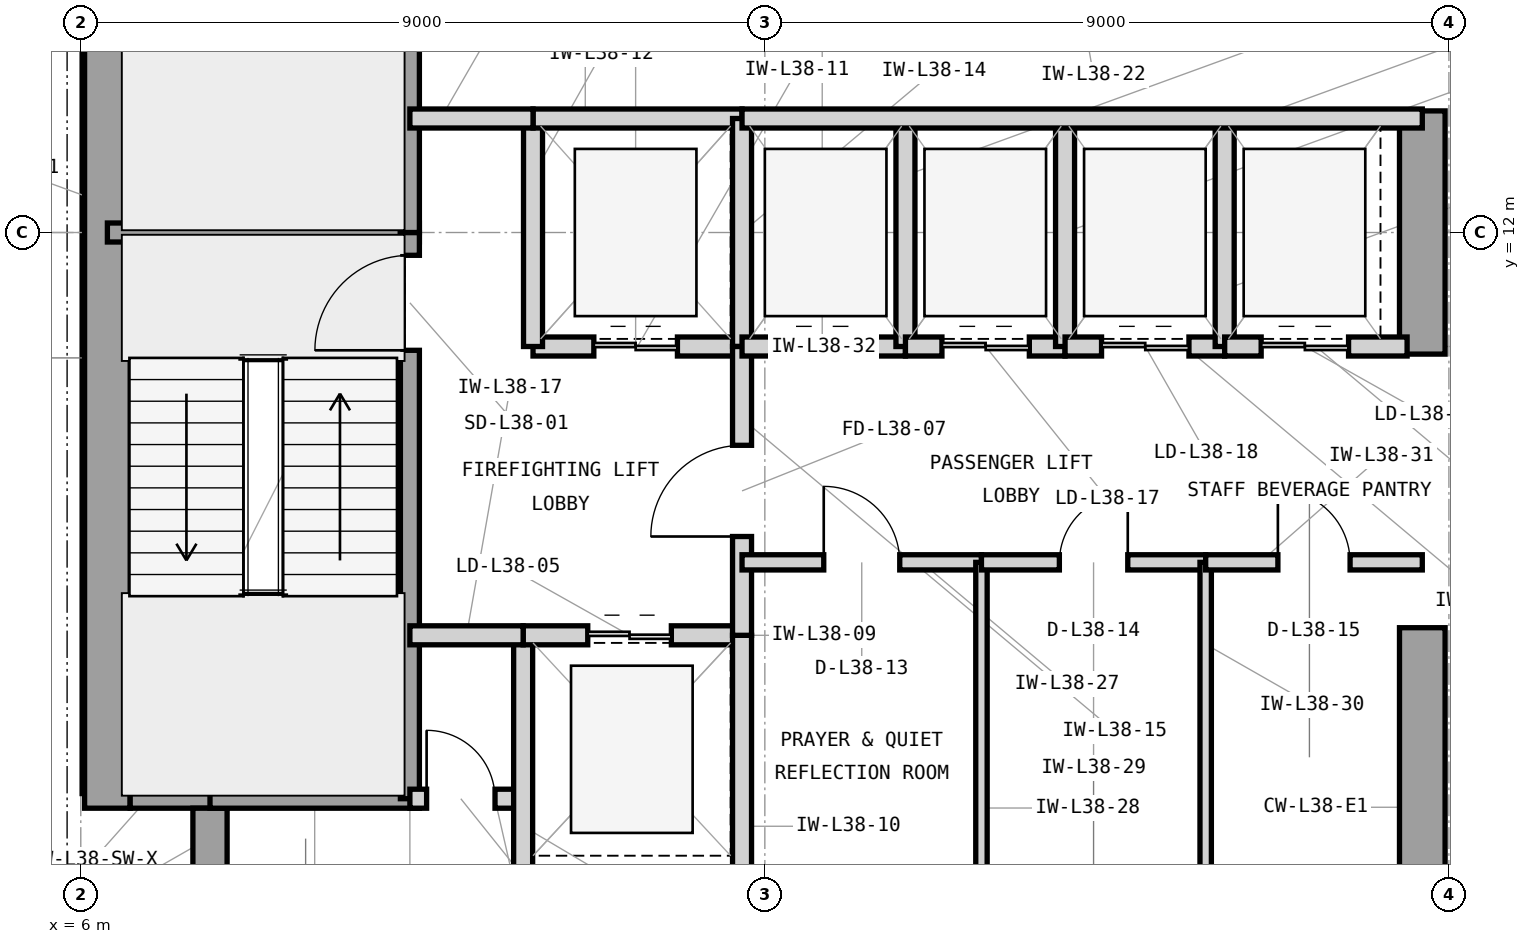
"""IFC4 building model, lengths in metres.
Left out: names, types, materials, properties, quantities, classifications, styles, units other than length and angle.
Written with IfcOpenShell. Run it as: python <this file> out.ifc"""

import sys

from ifc_helpers import new_model, si_unit, direction, frame, frame_2d, origin, place, context, subcontext, project, spatial, rectangle, extrude, element, fill, save


model = new_model("IFC4")
c1 = context("Model", 3, precision=1e-05, world=origin(), true_north=direction((0.0, 1.0)))
c2 = subcontext(c1, "Body", "Model", "MODEL_VIEW")
j1 = project(units=[si_unit("LENGTHUNIT", "METRE"), si_unit("PLANEANGLEUNIT", "RADIAN")], contexts=[c1])
p1 = place(None, origin())
s1 = spatial("IfcSite", under=j1, at=p1, CompositionType="ELEMENT")
p2 = place(p1, origin())
s2 = spatial("IfcBuilding", under=s1, at=p2, CompositionType="ELEMENT")
p3 = place(p2, frame((0.0, 0.0, 160.2)))
s3 = spatial("IfcBuildingStorey", under=s2, at=p3, CompositionType="ELEMENT", Elevation=160.2)
p4 = place(p3, frame((6.35, 4.425, 0.0), z_axis=(0.0, 0.0, 1.0), x_axis=(0.0, 1.0, 0.0)))
e1 = element("IfcWall", 1, at=p4, inside=s3, PredefinedType="SHEAR", context=c2, shape_type="SweptSolid", body=[
    extrude(rectangle(XDim=15.15, YDim=0.6, at=frame_2d((7.575, 0.0))), origin(), (0.0, 0.0, 1.0), 4.2),
])
p5 = place(p3, frame((23.65, 3.65, 0.0), z_axis=(0.0, 0.0, 1.0), x_axis=(0.0, 1.0, 0.0)))
e2 = element("IfcWall", 2, at=p5, inside=s3, PredefinedType="SHEAR", context=c2, shape_type="SweptSolid", body=[
    extrude(rectangle(XDim=3.15, YDim=0.6, at=frame_2d((1.575, 0.0))), origin(), (0.0, 0.0, 1.0), 4.2),
])
p6 = place(p3, frame((23.65, 10.4, 0.0), z_axis=(0.0, 0.0, 1.0), x_axis=(0.0, 1.0, 0.0)))
e3 = element("IfcWall", 3, at=p6, inside=s3, PredefinedType="SHEAR", context=c2, shape_type="SweptSolid", body=[
    extrude(rectangle(XDim=3.2, YDim=0.6, at=frame_2d((1.6, 0.0))), origin(), (0.0, 0.0, 1.0), 4.2),
])
p7 = place(p3, frame((6.65, 4.65, 0.0), z_axis=(0.0, 0.0, 1.0), x_axis=(1.0, 0.0, 0.0)))
e4 = element("IfcWall", 4, at=p7, inside=s3, PredefinedType="SHEAR", context=c2, shape_type="SweptSolid", body=[
    extrude(rectangle(XDim=1.275, YDim=0.45, at=frame_2d((0.638, 0.0))), origin(), (0.0, 0.0, 1.0), 4.2),
])
p8 = place(p3, frame((7.7, 3.65, 0.0), z_axis=(0.0, 0.0, 1.0), x_axis=(0.0, 1.0, 0.0)))
e5 = element("IfcWall", 5, at=p8, inside=s3, PredefinedType="SHEAR", context=c2, shape_type="SweptSolid", body=[
    extrude(rectangle(XDim=0.775, YDim=0.45, at=frame_2d((0.388, 0.0))), origin(), (0.0, 0.0, 1.0), 4.2),
])
p9 = place(p3, frame((6.35, 12.0, 0.0), z_axis=(0.0, 0.0, 1.0), x_axis=(1.0, 0.0, 0.0)))
e6 = element("IfcWall", 6, at=p9, inside=s3, PredefinedType="SHEAR", context=c2, shape_type="SweptSolid", body=[
    extrude(rectangle(XDim=4.105, YDim=0.25, at=frame_2d((2.052, 0.0))), origin(), (0.0, 0.0, 1.0), 4.2),
])
p10 = place(p3, frame((7.7, 4.55, 0.0), z_axis=(0.0, 0.0, 1.0), x_axis=(1.0, 0.0, 0.0)))
e7 = element("IfcWall", 7, at=p10, inside=s3, PredefinedType="SHEAR", context=c2, shape_type="SweptSolid", body=[
    extrude(rectangle(XDim=2.755, YDim=0.25, at=frame_2d((1.377, 0.0))), origin(), (0.0, 0.0, 1.0), 4.2),
])
p11 = place(p3, frame((10.33, 4.55, 0.0), z_axis=(0.0, 0.0, 1.0), x_axis=(0.0, 1.0, 0.0)))
e8 = element("IfcWall", 8, at=p11, inside=s3, PredefinedType="SHEAR", context=c2, shape_type="SweptSolid", body=[
    extrude(rectangle(XDim=7.45, YDim=0.25, at=frame_2d((3.725, 0.0))), origin(), (0.0, 0.0, 1.0), 4.2),
])
p12 = place(p11, frame((5.9, 0.0, 0.0)))
e9 = element("IfcOpeningElement", 9, at=p12, cuts=e8, PredefinedType="OPENING", context=c2, shape_type="SweptSolid", body=[
    extrude(rectangle(XDim=1.25, YDim=2.2, at=frame_2d((0.625, 1.1))), frame((0.0, 0.135, 0.0), z_axis=(0.0, -1.0, 0.0), x_axis=(1.0, 0.0, 0.0)), (0.0, 0.0, 1.0), 0.27),
])
p13 = place(p3, frame((10.33, 12.0, 0.0), z_axis=(0.0, 0.0, 1.0), x_axis=(0.0, 1.0, 0.0)))
e10 = element("IfcWall", 10, at=p13, inside=s3, PredefinedType="SHEAR", context=c2, shape_type="SweptSolid", body=[
    extrude(rectangle(XDim=7.45, YDim=0.25, at=frame_2d((3.725, 0.0))), origin(), (0.0, 0.0, 1.0), 4.2),
])
p14 = place(p13, frame((5.85, 0.0, 0.0)))
e11 = element("IfcOpeningElement", 11, at=p14, cuts=e10, PredefinedType="OPENING", context=c2, shape_type="SweptSolid", body=[
    extrude(rectangle(XDim=1.25, YDim=2.2, at=frame_2d((0.625, 1.1))), frame((0.0, 0.135, 0.0), z_axis=(0.0, -1.0, 0.0), x_axis=(1.0, 0.0, 0.0)), (0.0, 0.0, 1.0), 0.27),
])
p15 = place(p3, frame((10.33, 4.55, 0.0), z_axis=(0.0, 0.0, 1.0), x_axis=(1.0, 0.0, 0.0)))
e12 = element("IfcWall", 12, at=p15, inside=s3, PredefinedType="PARTITIONING", context=c2, shape_type="SweptSolid", body=[
    extrude(rectangle(XDim=1.49, YDim=0.25, at=frame_2d((0.745, 0.0))), origin(), (0.0, 0.0, 1.0), 3.93),
])
p16 = place(p15, frame((0.22, 0.0, 0.0)))
e13 = element("IfcOpeningElement", 13, at=p16, cuts=e12, PredefinedType="OPENING", context=c2, shape_type="SweptSolid", body=[
    extrude(rectangle(XDim=0.9, YDim=2.1, at=frame_2d((0.45, 1.05))), frame((0.0, 0.135, 0.0), z_axis=(0.0, -1.0, 0.0), x_axis=(1.0, 0.0, 0.0)), (0.0, 0.0, 1.0), 0.27),
])
p17 = place(p3, frame((11.82, 3.35, 0.0), z_axis=(0.0, 0.0, 1.0), x_axis=(0.0, 1.0, 0.0)))
e14 = element("IfcWall", 14, at=p17, inside=s3, PredefinedType="PARTITIONING", context=c2, shape_type="SweptSolid", body=[
    extrude(rectangle(XDim=3.35, YDim=0.25, at=frame_2d((1.675, 0.0))), origin(), (0.0, 0.0, 1.0), 3.93),
])
p18 = place(p3, frame((11.82, 6.7, 0.0), z_axis=(0.0, 0.0, 1.0), x_axis=(1.0, 0.0, 0.0)))
e15 = element("IfcWall", 15, at=p18, inside=s3, PredefinedType="PARTITIONING", context=c2, shape_type="SweptSolid", body=[
    extrude(rectangle(XDim=2.88, YDim=0.25, at=frame_2d((1.44, 0.0))), origin(), (0.0, 0.0, 1.0), 3.583),
])
p19 = place(p18, frame((0.85, 0.0, 0.0)))
e16 = element("IfcOpeningElement", 16, at=p19, cuts=e15, PredefinedType="OPENING", context=c2, shape_type="SweptSolid", body=[
    extrude(rectangle(XDim=1.1, YDim=2.25, at=frame_2d((0.55, 1.125))), frame((0.0, 0.135, 0.0), z_axis=(0.0, -1.0, 0.0), x_axis=(1.0, 0.0, 0.0)), (0.0, 0.0, 1.0), 0.27),
])
p20 = place(p3, frame((14.7, 3.35, 0.0), z_axis=(0.0, 0.0, 1.0), x_axis=(0.0, 1.0, 0.0)))
e17 = element("IfcWall", 17, at=p20, inside=s3, PredefinedType="PARTITIONING", context=c2, shape_type="SweptSolid", body=[
    extrude(rectangle(XDim=3.35, YDim=0.25, at=frame_2d((1.675, 0.0))), origin(), (0.0, 0.0, 1.0), 3.93),
])
p21 = place(p3, frame((11.95, 10.5, 0.0), z_axis=(0.0, 0.0, 1.0), x_axis=(1.0, 0.0, 0.0)))
e18 = element("IfcWall", 18, at=p21, inside=s3, PredefinedType="PARTITIONING", context=c2, shape_type="SweptSolid", body=[
    extrude(rectangle(XDim=2.75, YDim=0.25, at=frame_2d((1.375, 0.0))), origin(), (0.0, 0.0, 1.0), 3.583),
])
p22 = place(p21, frame((0.8, 0.0, 0.0)))
e19 = element("IfcOpeningElement", 19, at=p22, cuts=e18, PredefinedType="OPENING", context=c2, shape_type="SweptSolid", body=[
    extrude(rectangle(XDim=1.1, YDim=2.25, at=frame_2d((0.55, 1.125))), frame((0.0, 0.135, 0.0), z_axis=(0.0, -1.0, 0.0), x_axis=(1.0, 0.0, 0.0)), (0.0, 0.0, 1.0), 0.27),
])
p23 = place(p3, frame((11.95, 10.5, 0.0), z_axis=(0.0, 0.0, 1.0), x_axis=(0.0, 1.0, 0.0)))
e20 = element("IfcWall", 20, at=p23, inside=s3, PredefinedType="PARTITIONING", context=c2, shape_type="SweptSolid", body=[
    extrude(rectangle(XDim=3.0, YDim=0.25, at=frame_2d((1.5, 0.0))), origin(), (0.0, 0.0, 1.0), 3.93),
])
p24 = place(p3, frame((11.95, 13.5, 0.0), z_axis=(0.0, 0.0, 1.0), x_axis=(1.0, 0.0, 0.0)))
e21 = element("IfcWall", 21, at=p24, inside=s3, PredefinedType="PARTITIONING", context=c2, shape_type="SweptSolid", body=[
    extrude(rectangle(XDim=2.75, YDim=0.25, at=frame_2d((1.375, 0.0))), origin(), (0.0, 0.0, 1.0), 3.583),
])
p25 = place(p3, frame((14.7, 10.5, 0.0), z_axis=(0.0, 0.0, 1.0), x_axis=(0.0, 1.0, 0.0)))
e22 = element("IfcWall", 22, at=p25, inside=s3, PredefinedType="PARTITIONING", context=c2, shape_type="SweptSolid", body=[
    extrude(rectangle(XDim=3.0, YDim=0.25, at=frame_2d((1.5, 0.0))), origin(), (0.0, 0.0, 1.0), 3.93),
])
p26 = place(p3, frame((14.7, 6.7, 0.0), z_axis=(0.0, 0.0, 1.0), x_axis=(0.0, 1.0, 0.0)))
e23 = element("IfcWall", 23, at=p26, inside=s3, PredefinedType="PARTITIONING", context=c2, shape_type="SweptSolid", body=[
    extrude(rectangle(XDim=3.8, YDim=0.25, at=frame_2d((1.9, 0.0))), origin(), (0.0, 0.0, 1.0), 3.93),
])
p27 = place(p26, frame((1.3, 0.0, 0.0)))
e24 = element("IfcOpeningElement", 24, at=p27, cuts=e23, PredefinedType="OPENING", context=c2, shape_type="SweptSolid", body=[
    extrude(rectangle(XDim=1.2, YDim=2.2, at=frame_2d((0.6, 1.1))), frame((0.0, 0.135, 0.0), z_axis=(0.0, -1.0, 0.0), x_axis=(1.0, 0.0, 0.0)), (0.0, 0.0, 1.0), 0.27),
])
p28 = place(p3, frame((10.33, 13.5, 0.0), z_axis=(0.0, 0.0, 1.0), x_axis=(1.0, 0.0, 0.0)))
e25 = element("IfcWall", 25, at=p28, inside=s3, PredefinedType="PARTITIONING", context=c2, shape_type="SweptSolid", body=[
    extrude(rectangle(XDim=1.62, YDim=0.25, at=frame_2d((0.81, 0.0))), origin(), (0.0, 0.0, 1.0), 3.583),
])
p29 = place(p3, frame((10.33, 6.7, 0.0), z_axis=(0.0, 0.0, 1.0), x_axis=(1.0, 0.0, 0.0)))
e26 = element("IfcWall", 26, at=p29, inside=s3, PredefinedType="PARTITIONING", context=c2, shape_type="SweptSolid", body=[
    extrude(rectangle(XDim=1.49, YDim=0.25, at=frame_2d((0.745, 0.0))), origin(), (0.0, 0.0, 1.0), 3.583),
])
p30 = place(p3, frame((14.7, 7.66, 0.0), z_axis=(0.0, 0.0, 1.0), x_axis=(1.0, 0.0, 0.0)))
e27 = element("IfcWall", 27, at=p30, inside=s3, PredefinedType="PARTITIONING", context=c2, shape_type="SweptSolid", body=[
    extrude(rectangle(XDim=3.15, YDim=0.2, at=frame_2d((1.575, 0.0))), origin(), (0.0, 0.0, 1.0), 3.93),
])
p31 = place(p30, frame((1.075, 0.0, 0.0)))
e28 = element("IfcOpeningElement", 28, at=p31, cuts=e27, PredefinedType="OPENING", context=c2, shape_type="SweptSolid", body=[
    extrude(rectangle(XDim=1.0, YDim=2.15, at=frame_2d((0.5, 1.075))), frame((0.0, 0.11, 0.0), z_axis=(0.0, -1.0, 0.0), x_axis=(1.0, 0.0, 0.0)), (0.0, 0.0, 1.0), 0.22),
])
p32 = place(p3, frame((17.85, 3.35, 0.0), z_axis=(0.0, 0.0, 1.0), x_axis=(0.0, 1.0, 0.0)))
e29 = element("IfcWall", 29, at=p32, inside=s3, PredefinedType="PARTITIONING", context=c2, shape_type="SweptSolid", body=[
    extrude(rectangle(XDim=4.31, YDim=0.15, at=frame_2d((2.155, 0.0))), origin(), (0.0, 0.0, 1.0), 3.93),
])
p33 = place(p3, frame((17.85, 7.66, 0.0), z_axis=(0.0, 0.0, 1.0), x_axis=(1.0, 0.0, 0.0)))
e30 = element("IfcWall", 30, at=p33, inside=s3, PredefinedType="PARTITIONING", context=c2, shape_type="SweptSolid", body=[
    extrude(rectangle(XDim=2.95, YDim=0.2, at=frame_2d((1.475, 0.0))), origin(), (0.0, 0.0, 1.0), 3.93),
])
p34 = place(p33, frame((1.025, 0.0, 0.0)))
e31 = element("IfcOpeningElement", 31, at=p34, cuts=e30, PredefinedType="OPENING", context=c2, shape_type="SweptSolid", body=[
    extrude(rectangle(XDim=0.9, YDim=2.1, at=frame_2d((0.45, 1.05))), frame((0.0, 0.11, 0.0), z_axis=(0.0, -1.0, 0.0), x_axis=(1.0, 0.0, 0.0)), (0.0, 0.0, 1.0), 0.22),
])
p35 = place(p3, frame((20.8, 3.35, 0.0), z_axis=(0.0, 0.0, 1.0), x_axis=(0.0, 1.0, 0.0)))
e32 = element("IfcWall", 32, at=p35, inside=s3, PredefinedType="PARTITIONING", context=c2, shape_type="SweptSolid", body=[
    extrude(rectangle(XDim=4.31, YDim=0.15, at=frame_2d((2.155, 0.0))), origin(), (0.0, 0.0, 1.0), 3.93),
])
p36 = place(p3, frame((20.8, 7.66, 0.0), z_axis=(0.0, 0.0, 1.0), x_axis=(1.0, 0.0, 0.0)))
e33 = element("IfcWall", 33, at=p36, inside=s3, PredefinedType="PARTITIONING", context=c2, shape_type="SweptSolid", body=[
    extrude(rectangle(XDim=2.85, YDim=0.2, at=frame_2d((1.425, 0.0))), origin(), (0.0, 0.0, 1.0), 3.93),
])
p37 = place(p36, frame((0.95, 0.0, 0.0)))
e34 = element("IfcOpeningElement", 34, at=p37, cuts=e33, PredefinedType="OPENING", context=c2, shape_type="SweptSolid", body=[
    extrude(rectangle(XDim=0.95, YDim=2.1, at=frame_2d((0.475, 1.05))), frame((0.0, 0.11, 0.0), z_axis=(0.0, -1.0, 0.0), x_axis=(1.0, 0.0, 0.0)), (0.0, 0.0, 1.0), 0.22),
])
p38 = place(p3, frame((14.7, 10.5, 0.0), z_axis=(0.0, 0.0, 1.0), x_axis=(1.0, 0.0, 0.0)))
e35 = element("IfcWall", 35, at=p38, inside=s3, PredefinedType="PARTITIONING", context=c2, shape_type="SweptSolid", body=[
    extrude(rectangle(XDim=2.15, YDim=0.25, at=frame_2d((1.075, 0.0))), origin(), (0.0, 0.0, 1.0), 3.583),
])
p39 = place(p38, frame((0.48, 0.0, 0.0)))
e36 = element("IfcOpeningElement", 36, at=p39, cuts=e35, PredefinedType="OPENING", context=c2, shape_type="SweptSolid", body=[
    extrude(rectangle(XDim=1.15, YDim=2.25, at=frame_2d((0.575, 1.125))), frame((0.0, 0.135, 0.0), z_axis=(0.0, -1.0, 0.0), x_axis=(1.0, 0.0, 0.0)), (0.0, 0.0, 1.0), 0.27),
])
p40 = place(p3, frame((16.85, 10.5, 0.0), z_axis=(0.0, 0.0, 1.0), x_axis=(0.0, 1.0, 0.0)))
e37 = element("IfcWall", 37, at=p40, inside=s3, PredefinedType="PARTITIONING", context=c2, shape_type="SweptSolid", body=[
    extrude(rectangle(XDim=3.0, YDim=0.25, at=frame_2d((1.5, 0.0))), origin(), (0.0, 0.0, 1.0), 3.93),
])
p41 = place(p3, frame((16.85, 10.5, 0.0), z_axis=(0.0, 0.0, 1.0), x_axis=(1.0, 0.0, 0.0)))
e38 = element("IfcWall", 38, at=p41, inside=s3, PredefinedType="PARTITIONING", context=c2, shape_type="SweptSolid", body=[
    extrude(rectangle(XDim=2.1, YDim=0.25, at=frame_2d((1.05, 0.0))), origin(), (0.0, 0.0, 1.0), 3.583),
])
p42 = place(p41, frame((0.48, 0.0, 0.0)))
e39 = element("IfcOpeningElement", 39, at=p42, cuts=e38, PredefinedType="OPENING", context=c2, shape_type="SweptSolid", body=[
    extrude(rectangle(XDim=1.15, YDim=2.25, at=frame_2d((0.575, 1.125))), frame((0.0, 0.135, 0.0), z_axis=(0.0, -1.0, 0.0), x_axis=(1.0, 0.0, 0.0)), (0.0, 0.0, 1.0), 0.27),
])
p43 = place(p3, frame((18.95, 10.5, 0.0), z_axis=(0.0, 0.0, 1.0), x_axis=(0.0, 1.0, 0.0)))
e40 = element("IfcWall", 40, at=p43, inside=s3, PredefinedType="PARTITIONING", context=c2, shape_type="SweptSolid", body=[
    extrude(rectangle(XDim=3.0, YDim=0.25, at=frame_2d((1.5, 0.0))), origin(), (0.0, 0.0, 1.0), 3.93),
])
p44 = place(p3, frame((18.95, 10.5, 0.0), z_axis=(0.0, 0.0, 1.0), x_axis=(1.0, 0.0, 0.0)))
e41 = element("IfcWall", 41, at=p44, inside=s3, PredefinedType="PARTITIONING", context=c2, shape_type="SweptSolid", body=[
    extrude(rectangle(XDim=2.1, YDim=0.25, at=frame_2d((1.05, 0.0))), origin(), (0.0, 0.0, 1.0), 3.583),
])
p45 = place(p44, frame((0.48, 0.0, 0.0)))
e42 = element("IfcOpeningElement", 42, at=p45, cuts=e41, PredefinedType="OPENING", context=c2, shape_type="SweptSolid", body=[
    extrude(rectangle(XDim=1.15, YDim=2.25, at=frame_2d((0.575, 1.125))), frame((0.0, 0.135, 0.0), z_axis=(0.0, -1.0, 0.0), x_axis=(1.0, 0.0, 0.0)), (0.0, 0.0, 1.0), 0.27),
])
p46 = place(p3, frame((21.05, 10.5, 0.0), z_axis=(0.0, 0.0, 1.0), x_axis=(0.0, 1.0, 0.0)))
e43 = element("IfcWall", 43, at=p46, inside=s3, PredefinedType="PARTITIONING", context=c2, shape_type="SweptSolid", body=[
    extrude(rectangle(XDim=3.0, YDim=0.25, at=frame_2d((1.5, 0.0))), origin(), (0.0, 0.0, 1.0), 3.93),
])
p47 = place(p3, frame((21.05, 10.5, 0.0), z_axis=(0.0, 0.0, 1.0), x_axis=(1.0, 0.0, 0.0)))
e44 = element("IfcWall", 44, at=p47, inside=s3, PredefinedType="PARTITIONING", context=c2, shape_type="SweptSolid", body=[
    extrude(rectangle(XDim=2.4, YDim=0.25, at=frame_2d((1.2, 0.0))), origin(), (0.0, 0.0, 1.0), 3.583),
])
p48 = place(p47, frame((0.48, 0.0, 0.0)))
e45 = element("IfcOpeningElement", 45, at=p48, cuts=e44, PredefinedType="OPENING", context=c2, shape_type="SweptSolid", body=[
    extrude(rectangle(XDim=1.15, YDim=2.25, at=frame_2d((0.575, 1.125))), frame((0.0, 0.135, 0.0), z_axis=(0.0, -1.0, 0.0), x_axis=(1.0, 0.0, 0.0)), (0.0, 0.0, 1.0), 0.27),
])
p49 = place(p3, frame((14.7, 13.5, 0.0), z_axis=(0.0, 0.0, 1.0), x_axis=(1.0, 0.0, 0.0)))
e46 = element("IfcWall", 46, at=p49, inside=s3, PredefinedType="PARTITIONING", context=c2, shape_type="SweptSolid", body=[
    extrude(rectangle(XDim=8.95, YDim=0.25, at=frame_2d((4.475, 0.0))), origin(), (0.0, 0.0, 1.0), 3.583),
])
p50 = place(p12, origin())
e47 = element("IfcDoor", 47, at=p50, inside=s3, OperationType="SINGLE_SWING_LEFT", PredefinedType="DOOR", context=c2, shape_type="SweptSolid", body=[
    extrude(rectangle(XDim=1.25, YDim=2.2, at=frame_2d((0.625, 1.1))), frame((0.0, 0.025, 0.0), z_axis=(0.0, -1.0, 0.0), x_axis=(1.0, 0.0, 0.0)), (0.0, 0.0, 1.0), 0.05),
])
fill(e9, e47)
p51 = place(p16, origin())
e48 = element("IfcDoor", 48, at=p51, inside=s3, OperationType="SINGLE_SWING_LEFT", PredefinedType="TRAPDOOR", context=c2, shape_type="SweptSolid", body=[
    extrude(rectangle(XDim=0.9, YDim=2.1, at=frame_2d((0.45, 1.05))), frame((0.0, 0.025, 0.0), z_axis=(0.0, -1.0, 0.0), x_axis=(1.0, 0.0, 0.0)), (0.0, 0.0, 1.0), 0.05),
])
fill(e13, e48)
p52 = place(p19, origin())
e49 = element("IfcDoor", 49, at=p52, inside=s3, OperationType="DOUBLE_DOOR_SLIDING", PredefinedType="DOOR", context=c2, shape_type="SweptSolid", body=[
    extrude(rectangle(XDim=1.1, YDim=2.25, at=frame_2d((0.55, 1.125))), frame((0.0, 0.025, 0.0), z_axis=(0.0, -1.0, 0.0), x_axis=(1.0, 0.0, 0.0)), (0.0, 0.0, 1.0), 0.05),
])
fill(e16, e49)
p53 = place(p22, origin())
e50 = element("IfcDoor", 50, at=p53, inside=s3, OperationType="DOUBLE_DOOR_SLIDING", PredefinedType="DOOR", context=c2, shape_type="SweptSolid", body=[
    extrude(rectangle(XDim=1.1, YDim=2.25, at=frame_2d((0.55, 1.125))), frame((0.0, 0.025, 0.0), z_axis=(0.0, -1.0, 0.0), x_axis=(1.0, 0.0, 0.0)), (0.0, 0.0, 1.0), 0.05),
])
fill(e19, e50)
p54 = place(p27, origin())
e51 = element("IfcDoor", 51, at=p54, inside=s3, OperationType="SINGLE_SWING_LEFT", PredefinedType="DOOR", context=c2, shape_type="SweptSolid", body=[
    extrude(rectangle(XDim=1.2, YDim=2.2, at=frame_2d((0.6, 1.1))), frame((0.0, 0.025, 0.0), z_axis=(0.0, -1.0, 0.0), x_axis=(1.0, 0.0, 0.0)), (0.0, 0.0, 1.0), 0.05),
])
fill(e24, e51)
p55 = place(p31, origin())
e52 = element("IfcDoor", 52, at=p55, inside=s3, OperationType="SINGLE_SWING_LEFT", PredefinedType="DOOR", context=c2, shape_type="SweptSolid", body=[
    extrude(rectangle(XDim=1.0, YDim=2.15, at=frame_2d((0.5, 1.075))), frame((0.0, 0.025, 0.0), z_axis=(0.0, -1.0, 0.0), x_axis=(1.0, 0.0, 0.0)), (0.0, 0.0, 1.0), 0.05),
])
fill(e28, e52)
p56 = place(p34, origin())
e53 = element("IfcDoor", 53, at=p56, inside=s3, OperationType="SINGLE_SWING_RIGHT", PredefinedType="TRAPDOOR", context=c2, shape_type="SweptSolid", body=[
    extrude(rectangle(XDim=0.9, YDim=2.1, at=frame_2d((0.45, 1.05))), frame((0.0, 0.025, 0.0), z_axis=(0.0, -1.0, 0.0), x_axis=(1.0, 0.0, 0.0)), (0.0, 0.0, 1.0), 0.05),
])
fill(e31, e53)
p57 = place(p37, origin())
e54 = element("IfcDoor", 54, at=p57, inside=s3, OperationType="SINGLE_SWING_LEFT", PredefinedType="DOOR", context=c2, shape_type="SweptSolid", body=[
    extrude(rectangle(XDim=0.95, YDim=2.1, at=frame_2d((0.475, 1.05))), frame((0.0, 0.025, 0.0), z_axis=(0.0, -1.0, 0.0), x_axis=(1.0, 0.0, 0.0)), (0.0, 0.0, 1.0), 0.05),
])
fill(e34, e54)
p58 = place(p39, origin())
e55 = element("IfcDoor", 55, at=p58, inside=s3, OperationType="DOUBLE_DOOR_SLIDING", PredefinedType="DOOR", context=c2, shape_type="SweptSolid", body=[
    extrude(rectangle(XDim=1.15, YDim=2.25, at=frame_2d((0.575, 1.125))), frame((0.0, 0.025, 0.0), z_axis=(0.0, -1.0, 0.0), x_axis=(1.0, 0.0, 0.0)), (0.0, 0.0, 1.0), 0.05),
])
fill(e36, e55)
p59 = place(p42, origin())
e56 = element("IfcDoor", 56, at=p59, inside=s3, OperationType="DOUBLE_DOOR_SLIDING", PredefinedType="DOOR", context=c2, shape_type="SweptSolid", body=[
    extrude(rectangle(XDim=1.15, YDim=2.25, at=frame_2d((0.575, 1.125))), frame((0.0, 0.025, 0.0), z_axis=(0.0, -1.0, 0.0), x_axis=(1.0, 0.0, 0.0)), (0.0, 0.0, 1.0), 0.05),
])
fill(e39, e56)
p60 = place(p45, origin())
e57 = element("IfcDoor", 57, at=p60, inside=s3, OperationType="DOUBLE_DOOR_SLIDING", PredefinedType="DOOR", context=c2, shape_type="SweptSolid", body=[
    extrude(rectangle(XDim=1.15, YDim=2.25, at=frame_2d((0.575, 1.125))), frame((0.0, 0.025, 0.0), z_axis=(0.0, -1.0, 0.0), x_axis=(1.0, 0.0, 0.0)), (0.0, 0.0, 1.0), 0.05),
])
fill(e42, e57)
p61 = place(p48, origin())
e58 = element("IfcDoor", 58, at=p61, inside=s3, OperationType="DOUBLE_DOOR_SLIDING", PredefinedType="DOOR", context=c2, shape_type="SweptSolid", body=[
    extrude(rectangle(XDim=1.15, YDim=2.25, at=frame_2d((0.575, 1.125))), frame((0.0, 0.025, 0.0), z_axis=(0.0, -1.0, 0.0), x_axis=(1.0, 0.0, 0.0)), (0.0, 0.0, 1.0), 0.05),
])
fill(e45, e58)
save(model, sys.argv[1])
